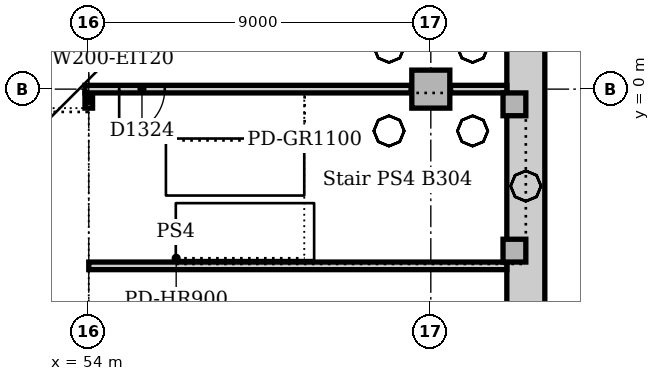
"""IFC4 building model, lengths in metres.
Left out: names, types, materials, properties, quantities, classifications, styles, units other than length and angle.
Written with IfcOpenShell. Run it as: python <this file> out.ifc"""

import sys

from ifc_helpers import new_model, si_unit, direction, frame, frame_2d, origin, origin_2d, place, context, subcontext, project, spatial, rectangle, extrude, element, fill, save


model = new_model("IFC4")
c1 = context("Model", 3, precision=1e-05, world=origin(), true_north=direction((0.0, 1.0)))
c2 = subcontext(c1, "Body", "Model", "MODEL_VIEW")
j1 = project(units=[si_unit("LENGTHUNIT", "METRE"), si_unit("PLANEANGLEUNIT", "RADIAN")], contexts=[c1])
p1 = place(None, origin())
s1 = spatial("IfcSite", under=j1, at=p1, CompositionType="ELEMENT")
p2 = place(p1, origin())
s2 = spatial("IfcBuilding", under=s1, at=p2, CompositionType="ELEMENT")
p3 = place(p2, frame((0.0, 0.0, -14.0)))
s3 = spatial("IfcBuildingStorey", under=s2, at=p3, CompositionType="ELEMENT", Elevation=-14.0)
p4 = place(p3, frame((65.5, 53.641, 0.0), z_axis=(0.0, 0.0, 1.0), x_axis=(0.0, -1.0, 0.0)))
e1 = element("IfcWall", 1, at=p4, inside=s3, PredefinedType="SOLIDWALL", context=c2, shape_type="SweptSolid", body=[
    extrude(rectangle(XDim=62.282, YDim=1.0, at=frame_2d((31.141, 0.0))), origin(), (0.0, 0.0, 1.0), 4.5),
])
p5 = place(p3, frame((63.0, 0.0, 0.0), z_axis=(0.0, 0.0, 1.0), x_axis=(1.0, 0.0, 0.0)))
e2 = element("IfcColumn", 2, at=p5, inside=s3, PredefinedType="COLUMN", context=c2, shape_type="SweptSolid", body=[
    extrude(rectangle(XDim=1.0, YDim=1.0, at=origin_2d()), origin(), (0.0, 0.0, 1.0), 4.15),
])
for number, where, z_axis, x_axis in (
    (3, (65.2, -4.25, 0.0), (0.0, 0.0, 1.0), (1.0, 0.0, 0.0)),
    (4, (65.2, -0.4, 0.0), (0.0, 0.0, 1.0), (1.0, 0.0, 0.0)),
):
    element("IfcColumn", number, at=place(p3, frame(where, z_axis=z_axis, x_axis=x_axis)), inside=s3, PredefinedType="COLUMN", context=c2, shape_type="SweptSolid", body=[
        extrude(rectangle(XDim=0.6, YDim=0.6, at=origin_2d()), origin(), (0.0, 0.0, 1.0), 4.5),
    ])
p6 = place(p3, frame((54.0, -0.5, 0.0), z_axis=(0.0, 0.0, 1.0), x_axis=(0.0, 1.0, 0.0)))
e5 = element("IfcWall", 5, at=p6, inside=s3, PredefinedType="SOLIDWALL", context=c2, shape_type="SweptSolid", body=[
    extrude(rectangle(XDim=0.4, YDim=0.2, at=frame_2d((0.2, 0.0))), origin(), (0.0, 0.0, 1.0), 4.15),
])
p7 = place(p3, frame((53.9, 0.0, 0.0), z_axis=(0.0, 0.0, 1.0), x_axis=(1.0, 0.0, 0.0)))
e6 = element("IfcWall", 6, at=p7, inside=s3, PredefinedType="SOLIDWALL", context=c2, shape_type="SweptSolid", body=[
    extrude(rectangle(XDim=8.58, YDim=0.2, at=frame_2d((4.29, 0.0))), origin(), (0.0, 0.0, 1.0), 4.15),
])
p8 = place(p7, frame((0.9, 0.0, 0.0)))
e7 = element("IfcOpeningElement", 7, at=p8, cuts=e6, PredefinedType="OPENING", context=c2, shape_type="SweptSolid", body=[
    extrude(rectangle(XDim=1.2, YDim=2.1, at=frame_2d((0.6, 1.05))), frame((0.0, 0.11, 0.0), z_axis=(0.0, -1.0, 0.0), x_axis=(1.0, 0.0, 0.0)), (0.0, 0.0, 1.0), 0.22),
])
p9 = place(p3, frame((63.52, 0.0, 0.0), z_axis=(0.0, 0.0, 1.0), x_axis=(1.0, 0.0, 0.0)))
e8 = element("IfcWall", 8, at=p9, inside=s3, PredefinedType="SOLIDWALL", context=c2, shape_type="SweptSolid", body=[
    extrude(rectangle(XDim=1.48, YDim=0.2, at=frame_2d((0.74, 0.0))), origin(), (0.0, 0.0, 1.0), 4.15),
])
p10 = place(p3, frame((54.0, -4.65, 0.0), z_axis=(0.0, 0.0, 1.0), x_axis=(1.0, 0.0, 0.0)))
e9 = element("IfcWall", 9, at=p10, inside=s3, PredefinedType="SOLIDWALL", context=c2, shape_type="SweptSolid", body=[
    extrude(rectangle(XDim=11.0, YDim=0.2, at=frame_2d((5.5, 0.0))), origin(), (0.0, 0.0, 1.0), 4.15),
])
p11 = place(p8, frame((1.2, 0.0, 0.0), z_axis=(0.0, 0.0, 1.0), x_axis=(-1.0, 0.0, 0.0)))
e10 = element("IfcDoor", 10, at=p11, inside=s3, OperationType="SINGLE_SWING_RIGHT", PredefinedType="DOOR", context=c2, shape_type="SweptSolid", body=[
    extrude(rectangle(XDim=1.2, YDim=2.1, at=frame_2d((0.6, 1.05))), frame((0.0, 0.025, 0.0), z_axis=(0.0, -1.0, 0.0), x_axis=(1.0, 0.0, 0.0)), (0.0, 0.0, 1.0), 0.05),
])
fill(e7, e10)
save(model, sys.argv[1])
